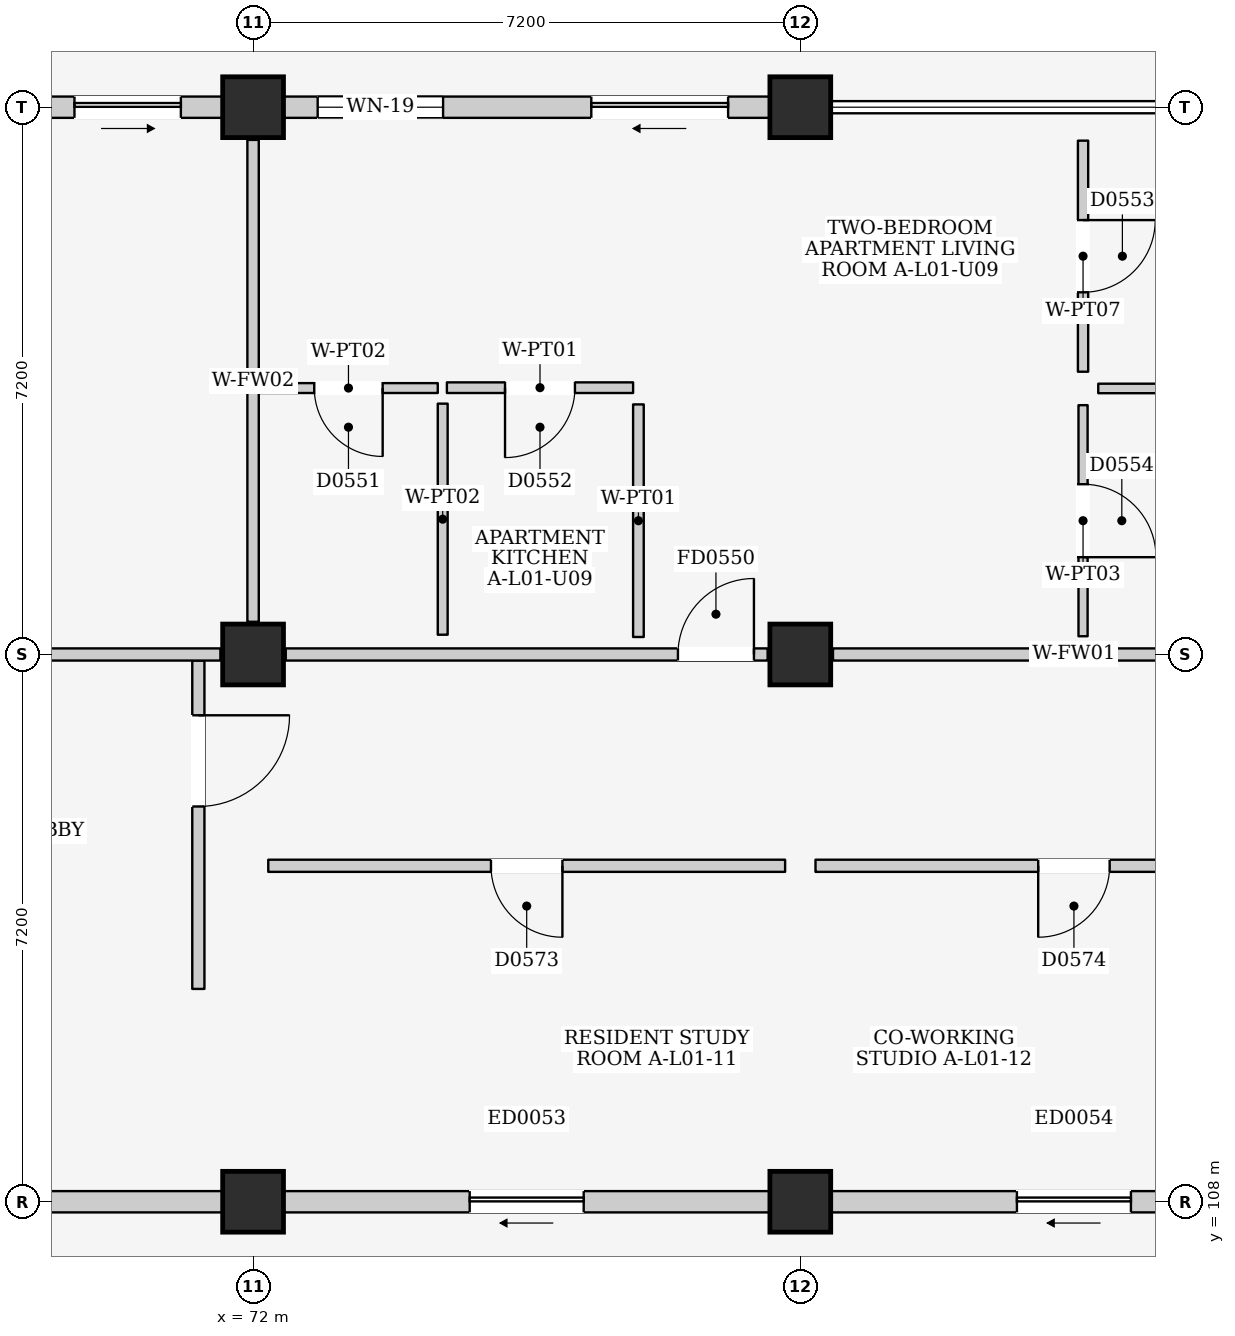
"""IFC4 building model, lengths in metres.
Left out: names, types, materials, properties, quantities, classifications, styles, units other than length and angle.
Written with IfcOpenShell. Run it as: python <this file> out.ifc"""

import sys

from ifc_helpers import new_model, si_unit, direction, frame, frame_2d, origin, origin_2d, place, context, subcontext, project, spatial, rectangle, extrude, element, fill, save


model = new_model("IFC4")
c1 = context("Model", 3, precision=1e-05, world=origin(), true_north=direction((0.0, 1.0)))
c2 = subcontext(c1, "Body", "Model", "MODEL_VIEW")
j1 = project(units=[si_unit("LENGTHUNIT", "METRE"), si_unit("PLANEANGLEUNIT", "RADIAN")], contexts=[c1])
p1 = place(None, origin())
s1 = spatial("IfcSite", under=j1, at=p1, CompositionType="ELEMENT")
p2 = place(p1, origin())
s2 = spatial("IfcBuilding", under=s1, at=p2, CompositionType="ELEMENT")
p3 = place(p2, frame((0.0, 0.0, 4.5)))
s3 = spatial("IfcBuildingStorey", under=s2, at=p3, CompositionType="ELEMENT", Elevation=4.5)
for number, where, z_axis, x_axis in (
    (1, (72.0, 108.0, 0.0), (0.0, 0.0, 1.0), (1.0, 0.0, 0.0)),
    (2, (72.0, 115.2, 0.0), (0.0, 0.0, 1.0), (1.0, 0.0, 0.0)),
    (3, (72.0, 122.4, 0.0), (0.0, 0.0, 1.0), (1.0, 0.0, 0.0)),
    (4, (79.2, 108.0, 0.0), (0.0, 0.0, 1.0), (1.0, 0.0, 0.0)),
    (5, (79.2, 115.2, 0.0), (0.0, 0.0, 1.0), (1.0, 0.0, 0.0)),
    (6, (79.2, 122.4, 0.0), (0.0, 0.0, 1.0), (1.0, 0.0, 0.0)),
):
    element("IfcColumn", number, at=place(p3, frame(where, z_axis=z_axis, x_axis=x_axis)), inside=s3, PredefinedType="COLUMN", context=c2, shape_type="SweptSolid", body=[
        extrude(rectangle(XDim=0.8, YDim=0.8, at=origin_2d()), origin(), (0.0, 0.0, 1.0), 4.5),
    ])
p4 = place(p3, frame((65.2, 122.4, 0.0), z_axis=(0.0, 0.0, 1.0), x_axis=(1.0, 0.0, 0.0)))
e7 = element("IfcWall", 7, at=p4, inside=s3, PredefinedType="ELEMENTEDWALL", context=c2, shape_type="SweptSolid", body=[
    extrude(rectangle(XDim=6.4, YDim=0.28, at=frame_2d((3.2, 0.0))), origin(), (0.0, 0.0, 1.0), 3.715),
])
p5 = place(p4, frame((4.45, 0.0, 0.0)))
e8 = element("IfcOpeningElement", 8, at=p5, cuts=e7, PredefinedType="OPENING", context=c2, shape_type="SweptSolid", body=[
    extrude(rectangle(XDim=1.4, YDim=2.1, at=frame_2d((0.7, 1.05))), frame((0.0, 0.155, 0.0), z_axis=(0.0, -1.0, 0.0), x_axis=(1.0, 0.0, 0.0)), (0.0, 0.0, 1.0), 0.31),
])
p6 = place(p4, frame((0.45, 0.0, 0.9)))
e9 = element("IfcOpeningElement", 9, at=p6, cuts=e7, PredefinedType="OPENING", context=c2, shape_type="SweptSolid", body=[
    extrude(rectangle(XDim=1.95, YDim=1.55, at=frame_2d((0.975, 0.775))), frame((0.0, 0.155, 0.0), z_axis=(0.0, -1.0, 0.0), x_axis=(1.0, 0.0, 0.0)), (0.0, 0.0, 1.0), 0.31),
])
p7 = place(p3, frame((65.2, 108.0, 0.0), z_axis=(0.0, 0.0, 1.0), x_axis=(1.0, 0.0, 0.0)))
e10 = element("IfcWall", 10, at=p7, inside=s3, PredefinedType="ELEMENTEDWALL", context=c2, shape_type="SweptSolid", body=[
    extrude(rectangle(XDim=6.4, YDim=0.28, at=frame_2d((3.2, 0.0))), origin(), (0.0, 0.0, 1.0), 3.585),
])
p8 = place(p7, frame((2.7, 0.0, 1.2)))
e11 = element("IfcOpeningElement", 11, at=p8, cuts=e10, PredefinedType="OPENING", context=c2, shape_type="SweptSolid", body=[
    extrude(rectangle(XDim=1.0, YDim=0.9, at=frame_2d((0.5, 0.45))), frame((0.0, 0.155, 0.0), z_axis=(0.0, -1.0, 0.0), x_axis=(1.0, 0.0, 0.0)), (0.0, 0.0, 1.0), 0.31),
])
p9 = place(p3, frame((72.4, 122.4, 0.0), z_axis=(0.0, 0.0, 1.0), x_axis=(1.0, 0.0, 0.0)))
e12 = element("IfcWall", 12, at=p9, inside=s3, PredefinedType="ELEMENTEDWALL", context=c2, shape_type="SweptSolid", body=[
    extrude(rectangle(XDim=6.4, YDim=0.28, at=frame_2d((3.2, 0.0))), origin(), (0.0, 0.0, 1.0), 3.715),
])
p10 = place(p9, frame((4.05, 0.0, 0.0)))
e13 = element("IfcOpeningElement", 13, at=p10, cuts=e12, PredefinedType="OPENING", context=c2, shape_type="SweptSolid", body=[
    extrude(rectangle(XDim=1.8, YDim=2.12, at=frame_2d((0.9, 1.06))), frame((0.0, 0.155, 0.0), z_axis=(0.0, -1.0, 0.0), x_axis=(1.0, 0.0, 0.0)), (0.0, 0.0, 1.0), 0.31),
])
p11 = place(p9, frame((0.45, 0.0, 0.9)))
e14 = element("IfcOpeningElement", 14, at=p11, cuts=e12, PredefinedType="OPENING", context=c2, shape_type="SweptSolid", body=[
    extrude(rectangle(XDim=1.65, YDim=1.35, at=frame_2d((0.825, 0.675))), frame((0.0, 0.155, 0.0), z_axis=(0.0, -1.0, 0.0), x_axis=(1.0, 0.0, 0.0)), (0.0, 0.0, 1.0), 0.31),
])
p12 = place(p3, frame((72.4, 108.0, 0.0), z_axis=(0.0, 0.0, 1.0), x_axis=(1.0, 0.0, 0.0)))
e15 = element("IfcWall", 15, at=p12, inside=s3, PredefinedType="ELEMENTEDWALL", context=c2, shape_type="SweptSolid", body=[
    extrude(rectangle(XDim=6.4, YDim=0.28, at=frame_2d((3.2, 0.0))), origin(), (0.0, 0.0, 1.0), 3.585),
])
p13 = place(p12, frame((2.45, 0.0, 0.0)))
e16 = element("IfcOpeningElement", 16, at=p13, cuts=e15, PredefinedType="OPENING", context=c2, shape_type="SweptSolid", body=[
    extrude(rectangle(XDim=1.5, YDim=2.12, at=frame_2d((0.75, 1.06))), frame((0.0, 0.155, 0.0), z_axis=(0.0, -1.0, 0.0), x_axis=(1.0, 0.0, 0.0)), (0.0, 0.0, 1.0), 0.31),
])
p14 = place(p3, frame((79.6, 108.0, 0.0), z_axis=(0.0, 0.0, 1.0), x_axis=(1.0, 0.0, 0.0)))
e17 = element("IfcWall", 17, at=p14, inside=s3, PredefinedType="ELEMENTEDWALL", context=c2, shape_type="SweptSolid", body=[
    extrude(rectangle(XDim=6.4, YDim=0.28, at=frame_2d((3.2, 0.0))), origin(), (0.0, 0.0, 1.0), 3.585),
])
p15 = place(p14, frame((2.45, 0.0, 0.0)))
e18 = element("IfcOpeningElement", 18, at=p15, cuts=e17, PredefinedType="OPENING", context=c2, shape_type="SweptSolid", body=[
    extrude(rectangle(XDim=1.5, YDim=2.12, at=frame_2d((0.75, 1.06))), frame((0.0, 0.155, 0.0), z_axis=(0.0, -1.0, 0.0), x_axis=(1.0, 0.0, 0.0)), (0.0, 0.0, 1.0), 0.31),
])
p16 = place(p3, frame((71.28, 110.8, 0.0), z_axis=(0.0, 0.0, 1.0), x_axis=(0.0, 1.0, 0.0)))
e19 = element("IfcWall", 19, at=p16, inside=s3, PredefinedType="PARTITIONING", context=c2, shape_type="SweptSolid", body=[
    extrude(rectangle(XDim=4.32, YDim=0.16, at=frame_2d((2.16, 0.0))), origin(), (0.0, 0.0, 1.0), 4.25),
])
p17 = place(p16, frame((2.4, 0.0, 0.0)))
e20 = element("IfcOpeningElement", 20, at=p17, cuts=e19, PredefinedType="OPENING", context=c2, shape_type="SweptSolid", body=[
    extrude(rectangle(XDim=1.2, YDim=2.2, at=frame_2d((0.6, 1.1))), frame((0.0, 0.095, 0.0), z_axis=(0.0, -1.0, 0.0), x_axis=(1.0, 0.0, 0.0)), (0.0, 0.0, 1.0), 0.19),
])
p18 = place(p3, frame((65.23, 115.2, 0.0), z_axis=(0.0, 0.0, 1.0), x_axis=(1.0, 0.0, 0.0)))
e21 = element("IfcWall", 21, at=p18, inside=s3, PredefinedType="PARTITIONING", context=c2, shape_type="SweptSolid", body=[
    extrude(rectangle(XDim=6.34, YDim=0.16, at=frame_2d((3.17, 0.0))), origin(), (0.0, 0.0, 1.0), 3.585),
])
p19 = place(p18, frame((2.67, 0.0, 0.0)))
e22 = element("IfcOpeningElement", 22, at=p19, cuts=e21, PredefinedType="OPENING", context=c2, shape_type="SweptSolid", body=[
    extrude(rectangle(XDim=1.0, YDim=2.15, at=frame_2d((0.5, 1.075))), frame((0.0, 0.095, 0.0), z_axis=(0.0, -1.0, 0.0), x_axis=(1.0, 0.0, 0.0)), (0.0, 0.0, 1.0), 0.19),
])
p20 = place(p3, frame((72.0, 115.63, 0.0), z_axis=(0.0, 0.0, 1.0), x_axis=(0.0, 1.0, 0.0)))
e23 = element("IfcWall", 23, at=p20, inside=s3, PredefinedType="PARTITIONING", context=c2, shape_type="SweptSolid", body=[
    extrude(rectangle(XDim=6.34, YDim=0.15, at=frame_2d((3.17, 0.0))), origin(), (0.0, 0.0, 1.0), 3.685),
])
p21 = place(p3, frame((72.43, 115.2, 0.0), z_axis=(0.0, 0.0, 1.0), x_axis=(1.0, 0.0, 0.0)))
e24 = element("IfcWall", 24, at=p21, inside=s3, PredefinedType="PARTITIONING", context=c2, shape_type="SweptSolid", body=[
    extrude(rectangle(XDim=6.34, YDim=0.16, at=frame_2d((3.17, 0.0))), origin(), (0.0, 0.0, 1.0), 3.585),
])
p22 = place(p21, frame((5.16, 0.0, 0.0)))
e25 = element("IfcOpeningElement", 25, at=p22, cuts=e24, PredefinedType="OPENING", context=c2, shape_type="SweptSolid", body=[
    extrude(rectangle(XDim=1.0, YDim=2.15, at=frame_2d((0.5, 1.075))), frame((0.0, 0.095, 0.0), z_axis=(0.0, -1.0, 0.0), x_axis=(1.0, 0.0, 0.0)), (0.0, 0.0, 1.0), 0.19),
])
p23 = place(p3, frame((79.63, 115.2, 0.0), z_axis=(0.0, 0.0, 1.0), x_axis=(1.0, 0.0, 0.0)))
e26 = element("IfcWall", 26, at=p23, inside=s3, PredefinedType="PARTITIONING", context=c2, shape_type="SweptSolid", body=[
    extrude(rectangle(XDim=6.34, YDim=0.16, at=frame_2d((3.17, 0.0))), origin(), (0.0, 0.0, 1.0), 3.585),
])
p24 = place(p3, frame((72.08, 118.705, 0.0), z_axis=(0.0, 0.0, 1.0), x_axis=(1.0, 0.0, 0.0)))
e27 = element("IfcWall", 27, at=p24, inside=s3, PredefinedType="PARTITIONING", context=c2, shape_type="SweptSolid", body=[
    extrude(rectangle(XDim=2.35, YDim=0.13, at=frame_2d((1.175, 0.0))), origin(), (0.0, 0.0, 1.0), 4.25),
])
p25 = place(p24, frame((0.725, 0.0, 0.0)))
e28 = element("IfcOpeningElement", 28, at=p25, cuts=e27, PredefinedType="OPENING", context=c2, shape_type="SweptSolid", body=[
    extrude(rectangle(XDim=0.9, YDim=2.1, at=frame_2d((0.45, 1.05))), frame((0.0, 0.08, 0.0), z_axis=(0.0, -1.0, 0.0), x_axis=(1.0, 0.0, 0.0)), (0.0, 0.0, 1.0), 0.16),
])
p26 = place(p3, frame((74.495, 115.46, 0.0), z_axis=(0.0, 0.0, 1.0), x_axis=(0.0, 1.0, 0.0)))
e29 = element("IfcWall", 29, at=p26, inside=s3, PredefinedType="PARTITIONING", context=c2, shape_type="SweptSolid", body=[
    extrude(rectangle(XDim=3.04, YDim=0.13, at=frame_2d((1.52, 0.0))), origin(), (0.0, 0.0, 1.0), 4.25),
])
p27 = place(p3, frame((74.55, 118.71, 0.0), z_axis=(0.0, 0.0, 1.0), x_axis=(1.0, 0.0, 0.0)))
e30 = element("IfcWall", 30, at=p27, inside=s3, PredefinedType="PARTITIONING", context=c2, shape_type="SweptSolid", body=[
    extrude(rectangle(XDim=2.45, YDim=0.14, at=frame_2d((1.225, 0.0))), origin(), (0.0, 0.0, 1.0), 4.25),
])
p28 = place(p27, frame((0.765, 0.0, 0.0)))
e31 = element("IfcOpeningElement", 31, at=p28, cuts=e30, PredefinedType="OPENING", context=c2, shape_type="SweptSolid", body=[
    extrude(rectangle(XDim=0.92, YDim=2.1, at=frame_2d((0.46, 1.05))), frame((0.0, 0.085, 0.0), z_axis=(0.0, -1.0, 0.0), x_axis=(1.0, 0.0, 0.0)), (0.0, 0.0, 1.0), 0.17),
])
p29 = place(p3, frame((77.07, 115.43, 0.0), z_axis=(0.0, 0.0, 1.0), x_axis=(0.0, 1.0, 0.0)))
e32 = element("IfcWall", 32, at=p29, inside=s3, PredefinedType="PARTITIONING", context=c2, shape_type="SweptSolid", body=[
    extrude(rectangle(XDim=3.06, YDim=0.14, at=frame_2d((1.53, 0.0))), origin(), (0.0, 0.0, 1.0), 4.25),
])
p30 = place(p3, frame((82.92, 118.92, 0.0), z_axis=(0.0, 0.0, 1.0), x_axis=(0.0, 1.0, 0.0)))
e33 = element("IfcWall", 33, at=p30, inside=s3, PredefinedType="PARTITIONING", context=c2, shape_type="SweptSolid", body=[
    extrude(rectangle(XDim=3.04, YDim=0.135, at=frame_2d((1.52, 0.0))), origin(), (0.0, 0.0, 1.0), 4.25),
])
p31 = place(p30, frame((1.045, 0.0, 0.0)))
e34 = element("IfcOpeningElement", 34, at=p31, cuts=e33, PredefinedType="OPENING", context=c2, shape_type="SweptSolid", body=[
    extrude(rectangle(XDim=0.95, YDim=2.15, at=frame_2d((0.475, 1.075))), frame((0.0, 0.083, 0.0), z_axis=(0.0, -1.0, 0.0), x_axis=(1.0, 0.0, 0.0)), (0.0, 0.0, 1.0), 0.165),
])
p32 = place(p3, frame((83.12, 118.7, 0.0), z_axis=(0.0, 0.0, 1.0), x_axis=(1.0, 0.0, 0.0)))
e35 = element("IfcWall", 35, at=p32, inside=s3, PredefinedType="PARTITIONING", context=c2, shape_type="SweptSolid", body=[
    extrude(rectangle(XDim=3.06, YDim=0.125, at=frame_2d((1.53, 0.0))), origin(), (0.0, 0.0, 1.0), 4.25),
])
p33 = place(p3, frame((82.92, 115.44, 0.0), z_axis=(0.0, 0.0, 1.0), x_axis=(0.0, 1.0, 0.0)))
e36 = element("IfcWall", 36, at=p33, inside=s3, PredefinedType="PARTITIONING", context=c2, shape_type="SweptSolid", body=[
    extrude(rectangle(XDim=3.04, YDim=0.12, at=frame_2d((1.52, 0.0))), origin(), (0.0, 0.0, 1.0), 4.25),
])
p34 = place(p33, frame((1.04, 0.0, 0.0)))
e37 = element("IfcOpeningElement", 37, at=p34, cuts=e36, PredefinedType="OPENING", context=c2, shape_type="SweptSolid", body=[
    extrude(rectangle(XDim=0.96, YDim=2.15, at=frame_2d((0.48, 1.075))), frame((0.0, 0.075, 0.0), z_axis=(0.0, -1.0, 0.0), x_axis=(1.0, 0.0, 0.0)), (0.0, 0.0, 1.0), 0.15),
])
p35 = place(p3, frame((72.2, 112.42, 0.0), z_axis=(0.0, 0.0, 1.0), x_axis=(1.0, 0.0, 0.0)))
e38 = element("IfcWall", 38, at=p35, inside=s3, PredefinedType="PARTITIONING", context=c2, shape_type="SweptSolid", body=[
    extrude(rectangle(XDim=6.8, YDim=0.16, at=frame_2d((3.4, 0.0))), origin(), (0.0, 0.0, 1.0), 4.25),
])
p36 = place(p35, frame((2.93, 0.0, 0.0)))
e39 = element("IfcOpeningElement", 39, at=p36, cuts=e38, PredefinedType="OPENING", context=c2, shape_type="SweptSolid", body=[
    extrude(rectangle(XDim=0.94, YDim=2.12, at=frame_2d((0.47, 1.06))), frame((0.0, 0.095, 0.0), z_axis=(0.0, -1.0, 0.0), x_axis=(1.0, 0.0, 0.0)), (0.0, 0.0, 1.0), 0.19),
])
p37 = place(p3, frame((79.4, 112.42, 0.0), z_axis=(0.0, 0.0, 1.0), x_axis=(1.0, 0.0, 0.0)))
e40 = element("IfcWall", 40, at=p37, inside=s3, PredefinedType="PARTITIONING", context=c2, shape_type="SweptSolid", body=[
    extrude(rectangle(XDim=6.8, YDim=0.16, at=frame_2d((3.4, 0.0))), origin(), (0.0, 0.0, 1.0), 4.25),
])
p38 = place(p37, frame((2.93, 0.0, 0.0)))
e41 = element("IfcOpeningElement", 41, at=p38, cuts=e40, PredefinedType="OPENING", context=c2, shape_type="SweptSolid", body=[
    extrude(rectangle(XDim=0.94, YDim=2.12, at=frame_2d((0.47, 1.06))), frame((0.0, 0.095, 0.0), z_axis=(0.0, -1.0, 0.0), x_axis=(1.0, 0.0, 0.0)), (0.0, 0.0, 1.0), 0.19),
])
p39 = place(p5, frame((1.4, 0.0, 0.0), z_axis=(0.0, 0.0, 1.0), x_axis=(-1.0, 0.0, 0.0)))
e42 = element("IfcDoor", 42, at=p39, inside=s3, OperationType="SLIDING_TO_RIGHT", PredefinedType="DOOR", context=c2, shape_type="SweptSolid", body=[
    extrude(rectangle(XDim=1.4, YDim=2.1, at=frame_2d((0.7, 1.05))), frame((0.0, 0.025, 0.0), z_axis=(0.0, -1.0, 0.0), x_axis=(1.0, 0.0, 0.0)), (0.0, 0.0, 1.0), 0.05),
])
fill(e8, e42)
p40 = place(p10, frame((1.8, 0.0, 0.0), z_axis=(0.0, 0.0, 1.0), x_axis=(-1.0, 0.0, 0.0)))
e43 = element("IfcDoor", 43, at=p40, inside=s3, OperationType="SLIDING_TO_LEFT", PredefinedType="DOOR", context=c2, shape_type="SweptSolid", body=[
    extrude(rectangle(XDim=1.8, YDim=2.12, at=frame_2d((0.9, 1.06))), frame((0.0, 0.025, 0.0), z_axis=(0.0, -1.0, 0.0), x_axis=(1.0, 0.0, 0.0)), (0.0, 0.0, 1.0), 0.05),
])
fill(e13, e43)
p41 = place(p11, origin())
e44 = element("IfcWindow", 44, at=p41, inside=s3, PartitioningType="DOUBLE_PANEL_VERTICAL", PredefinedType="WINDOW", context=c2, shape_type="SweptSolid", body=[
    extrude(rectangle(XDim=1.65, YDim=1.35, at=frame_2d((0.825, 0.675))), frame((0.0, 0.03, 0.0), z_axis=(0.0, -1.0, 0.0), x_axis=(1.0, 0.0, 0.0)), (0.0, 0.0, 1.0), 0.06),
])
fill(e14, e44)
p42 = place(p13, frame((1.5, 0.0, 0.0), z_axis=(0.0, 0.0, 1.0), x_axis=(-1.0, 0.0, 0.0)))
e45 = element("IfcDoor", 45, at=p42, inside=s3, OperationType="SLIDING_TO_LEFT", PredefinedType="DOOR", context=c2, shape_type="SweptSolid", body=[
    extrude(rectangle(XDim=1.5, YDim=2.12, at=frame_2d((0.75, 1.06))), frame((0.0, 0.025, 0.0), z_axis=(0.0, -1.0, 0.0), x_axis=(1.0, 0.0, 0.0)), (0.0, 0.0, 1.0), 0.05),
])
fill(e16, e45)
p43 = place(p15, frame((1.5, 0.0, 0.0), z_axis=(0.0, 0.0, 1.0), x_axis=(-1.0, 0.0, 0.0)))
e46 = element("IfcDoor", 46, at=p43, inside=s3, OperationType="SLIDING_TO_LEFT", PredefinedType="DOOR", context=c2, shape_type="SweptSolid", body=[
    extrude(rectangle(XDim=1.5, YDim=2.12, at=frame_2d((0.75, 1.06))), frame((0.0, 0.025, 0.0), z_axis=(0.0, -1.0, 0.0), x_axis=(1.0, 0.0, 0.0)), (0.0, 0.0, 1.0), 0.05),
])
fill(e18, e46)
p44 = place(p17, frame((1.2, 0.0, 0.0), z_axis=(0.0, 0.0, 1.0), x_axis=(-1.0, 0.0, 0.0)))
e47 = element("IfcDoor", 47, at=p44, inside=s3, OperationType="SINGLE_SWING_LEFT", PredefinedType="DOOR", context=c2, shape_type="SweptSolid", body=[
    extrude(rectangle(XDim=1.2, YDim=2.2, at=frame_2d((0.6, 1.1))), frame((0.0, 0.025, 0.0), z_axis=(0.0, -1.0, 0.0), x_axis=(1.0, 0.0, 0.0)), (0.0, 0.0, 1.0), 0.05),
])
fill(e20, e47)
p45 = place(p22, origin())
e48 = element("IfcDoor", 48, at=p45, inside=s3, OperationType="SINGLE_SWING_RIGHT", PredefinedType="DOOR", context=c2, shape_type="SweptSolid", body=[
    extrude(rectangle(XDim=1.0, YDim=2.15, at=frame_2d((0.5, 1.075))), frame((0.0, 0.025, 0.0), z_axis=(0.0, -1.0, 0.0), x_axis=(1.0, 0.0, 0.0)), (0.0, 0.0, 1.0), 0.05),
])
fill(e25, e48)
p46 = place(p25, frame((0.9, 0.0, 0.0), z_axis=(0.0, 0.0, 1.0), x_axis=(-1.0, 0.0, 0.0)))
e49 = element("IfcDoor", 49, at=p46, inside=s3, OperationType="SINGLE_SWING_LEFT", PredefinedType="DOOR", context=c2, shape_type="SweptSolid", body=[
    extrude(rectangle(XDim=0.9, YDim=2.1, at=frame_2d((0.45, 1.05))), frame((0.0, 0.025, 0.0), z_axis=(0.0, -1.0, 0.0), x_axis=(1.0, 0.0, 0.0)), (0.0, 0.0, 1.0), 0.05),
])
fill(e28, e49)
p47 = place(p28, frame((0.92, 0.0, 0.0), z_axis=(0.0, 0.0, 1.0), x_axis=(-1.0, 0.0, 0.0)))
e50 = element("IfcDoor", 50, at=p47, inside=s3, OperationType="SINGLE_SWING_RIGHT", PredefinedType="DOOR", context=c2, shape_type="SweptSolid", body=[
    extrude(rectangle(XDim=0.92, YDim=2.1, at=frame_2d((0.46, 1.05))), frame((0.0, 0.025, 0.0), z_axis=(0.0, -1.0, 0.0), x_axis=(1.0, 0.0, 0.0)), (0.0, 0.0, 1.0), 0.05),
])
fill(e31, e50)
p48 = place(p31, frame((0.95, 0.0, 0.0), z_axis=(0.0, 0.0, 1.0), x_axis=(-1.0, 0.0, 0.0)))
e51 = element("IfcDoor", 51, at=p48, inside=s3, OperationType="SINGLE_SWING_LEFT", PredefinedType="DOOR", context=c2, shape_type="SweptSolid", body=[
    extrude(rectangle(XDim=0.95, YDim=2.15, at=frame_2d((0.475, 1.075))), frame((0.0, 0.025, 0.0), z_axis=(0.0, -1.0, 0.0), x_axis=(1.0, 0.0, 0.0)), (0.0, 0.0, 1.0), 0.05),
])
fill(e34, e51)
p49 = place(p34, frame((0.96, 0.0, 0.0), z_axis=(0.0, 0.0, 1.0), x_axis=(-1.0, 0.0, 0.0)))
e52 = element("IfcDoor", 52, at=p49, inside=s3, OperationType="SINGLE_SWING_RIGHT", PredefinedType="DOOR", context=c2, shape_type="SweptSolid", body=[
    extrude(rectangle(XDim=0.96, YDim=2.15, at=frame_2d((0.48, 1.075))), frame((0.0, 0.025, 0.0), z_axis=(0.0, -1.0, 0.0), x_axis=(1.0, 0.0, 0.0)), (0.0, 0.0, 1.0), 0.05),
])
fill(e37, e52)
p50 = place(p36, frame((0.94, 0.0, 0.0), z_axis=(0.0, 0.0, 1.0), x_axis=(-1.0, 0.0, 0.0)))
e53 = element("IfcDoor", 53, at=p50, inside=s3, OperationType="SINGLE_SWING_LEFT", PredefinedType="DOOR", context=c2, shape_type="SweptSolid", body=[
    extrude(rectangle(XDim=0.94, YDim=2.12, at=frame_2d((0.47, 1.06))), frame((0.0, 0.025, 0.0), z_axis=(0.0, -1.0, 0.0), x_axis=(1.0, 0.0, 0.0)), (0.0, 0.0, 1.0), 0.05),
])
fill(e39, e53)
p51 = place(p38, frame((0.94, 0.0, 0.0), z_axis=(0.0, 0.0, 1.0), x_axis=(-1.0, 0.0, 0.0)))
e54 = element("IfcDoor", 54, at=p51, inside=s3, OperationType="SINGLE_SWING_RIGHT", PredefinedType="DOOR", context=c2, shape_type="SweptSolid", body=[
    extrude(rectangle(XDim=0.94, YDim=2.12, at=frame_2d((0.47, 1.06))), frame((0.0, 0.025, 0.0), z_axis=(0.0, -1.0, 0.0), x_axis=(1.0, 0.0, 0.0)), (0.0, 0.0, 1.0), 0.05),
])
fill(e41, e54)
save(model, sys.argv[1])
